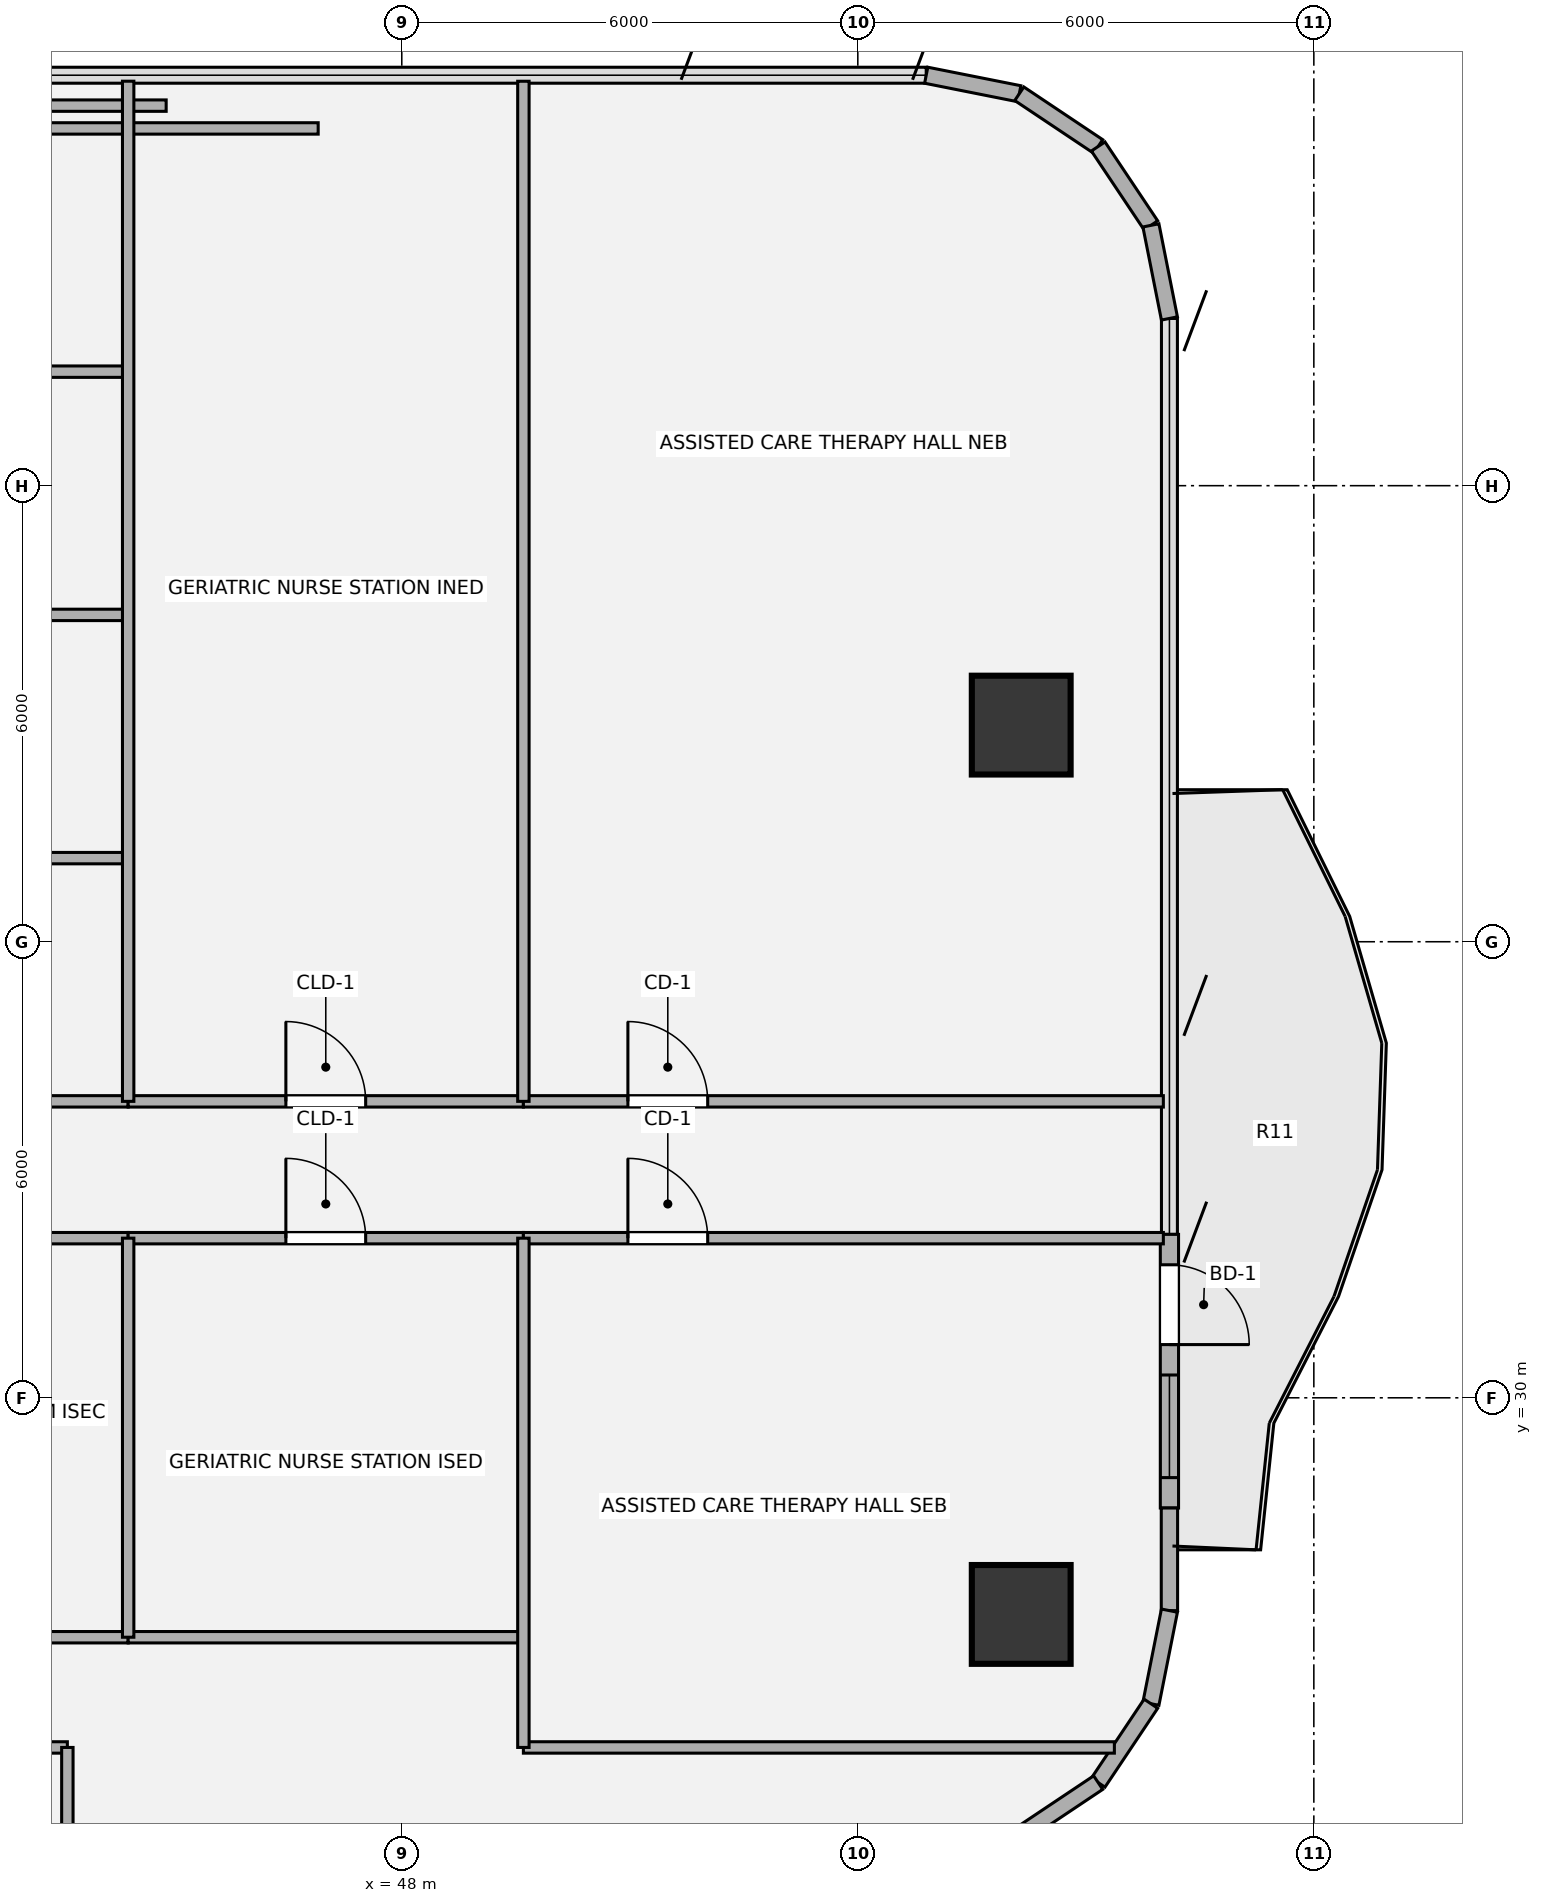
"""IFC4 building model, lengths in metres.
Left out: names, types, materials, properties, quantities, classifications, styles, units other than length and angle.
Written with IfcOpenShell. Run it as: python <this file> out.ifc"""

import sys

from ifc_helpers import new_model, si_unit, direction, frame, frame_2d, origin, origin_2d, place, context, subcontext, project, spatial, rectangle, hollow_circle, extrude, source, transform, mapped, element, fill, save


model = new_model("IFC4")
c1 = context("Model", 3, precision=1e-05, world=origin(), true_north=direction((0.0, 1.0)))
c2 = subcontext(c1, "Body", "Model", "MODEL_VIEW")
j1 = project(units=[si_unit("LENGTHUNIT", "METRE"), si_unit("PLANEANGLEUNIT", "RADIAN")], contexts=[c1])
p1 = place(None, origin())
s1 = spatial("IfcSite", under=j1, at=p1, CompositionType="ELEMENT")
p2 = place(p1, origin())
s2 = spatial("IfcBuilding", under=s1, at=p2, CompositionType="ELEMENT")
p3 = place(p2, frame((0.0, 0.0, 104.94)))
s3 = spatial("IfcBuildingStorey", under=s2, at=p3, CompositionType="ELEMENT", Elevation=104.94)
m1 = source(origin(), c2, "Body", "SweptSolid", [
    extrude(hollow_circle(Radius=0.65, WallThickness=0.045, at=origin_2d()), origin(), (0.0, 0.0, 1.0), 3.78),
])
for number, where, z_axis, x_axis in (
    (1, (56.15, 27.15, 0.0), (0.0, 0.0, 1.0), (1.0, 0.0, 0.0)),
    (2, (56.15, 38.85, 0.0), (0.0, 0.0, 1.0), (1.0, 0.0, 0.0)),
):
    element("IfcColumn", number, at=place(p3, frame(where, z_axis=z_axis, x_axis=x_axis)), inside=s3, PredefinedType="COLUMN", context=c2, shape_type="MappedRepresentation", body=[
        mapped(m1, transform((0.0, 0.0, 0.0), x_axis=(1.0, 0.0, 0.0), y_axis=(0.0, 1.0, 0.0), z_axis=(0.0, 0.0, 1.0), scale=1.0)),
    ])
for number, where, z_axis, x_axis in (
    (3, (54.9, 47.4, 0.0), (0.0, 0.0, 1.0), (0.981, -0.195, 0.0)),
    (4, (56.125, 47.156, 0.0), (0.0, 0.0, 1.0), (0.831, -0.556, 0.0)),
    (5, (57.163, 46.463, 0.0), (0.0, 0.0, 1.0), (0.556, -0.831, 0.0)),
    (6, (57.856, 45.425, 0.0), (0.0, 0.0, 1.0), (0.195, -0.981, 0.0)),
):
    element("IfcWall", number, at=place(p3, frame(where, z_axis=z_axis, x_axis=x_axis)), inside=s3, PredefinedType="SOLIDWALL", context=c2, shape_type="SweptSolid", body=[
        extrude(rectangle(XDim=1.249, YDim=0.215, at=frame_2d((0.624, 0.0))), origin(), (0.0, 0.0, 1.0), 3.53),
    ])
p4 = place(p3, frame((58.1, 32.15, 0.0), z_axis=(0.0, 0.0, 1.0), x_axis=(0.0, -1.0, 0.0)))
e7 = element("IfcWall", 7, at=p4, inside=s3, PredefinedType="SOLIDWALL", context=c2, shape_type="SweptSolid", body=[
    extrude(rectangle(XDim=3.6, YDim=0.24, at=frame_2d((1.8, 0.0))), origin(), (0.0, 0.0, 1.0), 3.53),
])
p5 = place(p4, frame((0.4, 0.0, 0.0)))
e8 = element("IfcOpeningElement", 8, at=p5, cuts=e7, PredefinedType="OPENING", context=c2, shape_type="SweptSolid", body=[
    extrude(rectangle(XDim=1.05, YDim=2.15, at=origin_2d()), frame((0.525, 0.13, 1.075), z_axis=(0.0, -1.0, 0.0), x_axis=(1.0, 0.0, 0.0)), (0.0, 0.0, 1.0), 0.26),
])
p6 = place(p4, frame((1.85, 0.0, 0.85)))
e9 = element("IfcOpeningElement", 9, at=p6, cuts=e7, PredefinedType="OPENING", context=c2, shape_type="SweptSolid", body=[
    extrude(rectangle(XDim=1.35, YDim=1.35, at=origin_2d()), frame((0.675, 0.13, 0.675), z_axis=(0.0, -1.0, 0.0), x_axis=(1.0, 0.0, 0.0)), (0.0, 0.0, 1.0), 0.26),
])
p7 = place(p3, frame((58.1, 28.55, 0.0), z_axis=(0.0, 0.0, 1.0), x_axis=(0.0, -1.0, 0.0)))
e10 = element("IfcWall", 10, at=p7, inside=s3, PredefinedType="SOLIDWALL", context=c2, shape_type="SweptSolid", body=[
    extrude(rectangle(XDim=1.35, YDim=0.215, at=frame_2d((0.675, 0.0))), origin(), (0.0, 0.0, 1.0), 3.53),
])
for number, where, z_axis, x_axis in (
    (11, (58.1, 27.2, 0.0), (0.0, 0.0, 1.0), (-0.195, -0.981, 0.0)),
    (12, (57.856, 25.975, 0.0), (0.0, 0.0, 1.0), (-0.556, -0.831, 0.0)),
    (13, (57.163, 24.937, 0.0), (0.0, 0.0, 1.0), (-0.831, -0.556, 0.0)),
):
    element("IfcWall", number, at=place(p3, frame(where, z_axis=z_axis, x_axis=x_axis)), inside=s3, PredefinedType="SOLIDWALL", context=c2, shape_type="SweptSolid", body=[
        extrude(rectangle(XDim=1.249, YDim=0.215, at=frame_2d((0.624, 0.0))), origin(), (0.0, 0.0, 1.0), 3.53),
    ])
p8 = place(p3, frame((36.9, 25.4, 0.0), z_axis=(0.0, 0.0, 1.0), x_axis=(1.0, 0.0, 0.0)))
e14 = element("IfcWall", 14, at=p8, inside=s3, PredefinedType="PARTITIONING", context=c2, shape_type="SweptSolid", body=[
    extrude(rectangle(XDim=6.7, YDim=0.15, at=frame_2d((3.35, 0.0))), origin(), (0.0, 0.0, 1.0), 3.5),
])
p9 = place(p3, frame((49.6, 25.4, 0.0), z_axis=(0.0, 0.0, 1.0), x_axis=(1.0, 0.0, 0.0)))
e15 = element("IfcWall", 15, at=p9, inside=s3, PredefinedType="PARTITIONING", context=c2, shape_type="SweptSolid", body=[
    extrude(rectangle(XDim=7.776, YDim=0.15, at=frame_2d((3.888, 0.0))), origin(), (0.0, 0.0, 1.0), 3.5),
])
p10 = place(p3, frame((36.9, 26.85, 0.0), z_axis=(0.0, 0.0, 1.0), x_axis=(1.0, 0.0, 0.0)))
e16 = element("IfcWall", 16, at=p10, inside=s3, PredefinedType="PARTITIONING", context=c2, shape_type="SweptSolid", body=[
    extrude(rectangle(XDim=7.5, YDim=0.15, at=frame_2d((3.75, 0.0))), origin(), (0.0, 0.0, 1.0), 2.903),
])
p11 = place(p3, frame((44.4, 26.85, 0.0), z_axis=(0.0, 0.0, 1.0), x_axis=(1.0, 0.0, 0.0)))
e17 = element("IfcWall", 17, at=p11, inside=s3, PredefinedType="PARTITIONING", context=c2, shape_type="SweptSolid", body=[
    extrude(rectangle(XDim=5.2, YDim=0.15, at=frame_2d((2.6, 0.0))), origin(), (0.0, 0.0, 1.0), 3.055),
])
p12 = place(p3, frame((36.9, 32.1, 0.0), z_axis=(0.0, 0.0, 1.0), x_axis=(1.0, 0.0, 0.0)))
e18 = element("IfcWall", 18, at=p12, inside=s3, PredefinedType="PARTITIONING", context=c2, shape_type="SweptSolid", body=[
    extrude(rectangle(XDim=7.5, YDim=0.15, at=frame_2d((3.75, 0.0))), origin(), (0.0, 0.0, 1.0), 2.982),
])
p13 = place(p3, frame((44.4, 32.1, 0.0), z_axis=(0.0, 0.0, 1.0), x_axis=(1.0, 0.0, 0.0)))
e19 = element("IfcWall", 19, at=p13, inside=s3, PredefinedType="PARTITIONING", context=c2, shape_type="SweptSolid", body=[
    extrude(rectangle(XDim=5.2, YDim=0.15, at=frame_2d((2.6, 0.0))), origin(), (0.0, 0.0, 1.0), 2.982),
])
p14 = place(p13, frame((2.075, 0.0, 0.0)))
e20 = element("IfcOpeningElement", 20, at=p14, cuts=e19, PredefinedType="OPENING", context=c2, shape_type="SweptSolid", body=[
    extrude(rectangle(XDim=1.05, YDim=2.1, at=origin_2d()), frame((0.525, 0.085, 1.05), z_axis=(0.0, -1.0, 0.0), x_axis=(1.0, 0.0, 0.0)), (0.0, 0.0, 1.0), 0.17),
])
p15 = place(p3, frame((49.6, 32.1, 0.0), z_axis=(0.0, 0.0, 1.0), x_axis=(1.0, 0.0, 0.0)))
e21 = element("IfcWall", 21, at=p15, inside=s3, PredefinedType="PARTITIONING", context=c2, shape_type="SweptSolid", body=[
    extrude(rectangle(XDim=8.42, YDim=0.15, at=frame_2d((4.21, 0.0))), origin(), (0.0, 0.0, 1.0), 2.982),
])
p16 = place(p15, frame((1.375, 0.0, 0.0)))
e22 = element("IfcOpeningElement", 22, at=p16, cuts=e21, PredefinedType="OPENING", context=c2, shape_type="SweptSolid", body=[
    extrude(rectangle(XDim=1.05, YDim=2.1, at=origin_2d()), frame((0.525, 0.085, 1.05), z_axis=(0.0, -1.0, 0.0), x_axis=(1.0, 0.0, 0.0)), (0.0, 0.0, 1.0), 0.17),
])
p17 = place(p3, frame((36.9, 33.9, 0.0), z_axis=(0.0, 0.0, 1.0), x_axis=(1.0, 0.0, 0.0)))
e23 = element("IfcWall", 23, at=p17, inside=s3, PredefinedType="PARTITIONING", context=c2, shape_type="SweptSolid", body=[
    extrude(rectangle(XDim=7.5, YDim=0.15, at=frame_2d((3.75, 0.0))), origin(), (0.0, 0.0, 1.0), 2.982),
])
p18 = place(p3, frame((44.4, 33.9, 0.0), z_axis=(0.0, 0.0, 1.0), x_axis=(1.0, 0.0, 0.0)))
e24 = element("IfcWall", 24, at=p18, inside=s3, PredefinedType="PARTITIONING", context=c2, shape_type="SweptSolid", body=[
    extrude(rectangle(XDim=5.2, YDim=0.15, at=frame_2d((2.6, 0.0))), origin(), (0.0, 0.0, 1.0), 2.982),
])
p19 = place(p18, frame((2.075, 0.0, 0.0)))
e25 = element("IfcOpeningElement", 25, at=p19, cuts=e24, PredefinedType="OPENING", context=c2, shape_type="SweptSolid", body=[
    extrude(rectangle(XDim=1.05, YDim=2.1, at=origin_2d()), frame((0.525, 0.085, 1.05), z_axis=(0.0, -1.0, 0.0), x_axis=(1.0, 0.0, 0.0)), (0.0, 0.0, 1.0), 0.17),
])
p20 = place(p3, frame((49.6, 33.9, 0.0), z_axis=(0.0, 0.0, 1.0), x_axis=(1.0, 0.0, 0.0)))
e26 = element("IfcWall", 26, at=p20, inside=s3, PredefinedType="PARTITIONING", context=c2, shape_type="SweptSolid", body=[
    extrude(rectangle(XDim=8.42, YDim=0.15, at=frame_2d((4.21, 0.0))), origin(), (0.0, 0.0, 1.0), 2.982),
])
p21 = place(p20, frame((1.375, 0.0, 0.0)))
e27 = element("IfcOpeningElement", 27, at=p21, cuts=e26, PredefinedType="OPENING", context=c2, shape_type="SweptSolid", body=[
    extrude(rectangle(XDim=1.05, YDim=2.1, at=origin_2d()), frame((0.525, 0.085, 1.05), z_axis=(0.0, -1.0, 0.0), x_axis=(1.0, 0.0, 0.0)), (0.0, 0.0, 1.0), 0.17),
])
p22 = place(p3, frame((36.9, 37.1, 0.0), z_axis=(0.0, 0.0, 1.0), x_axis=(1.0, 0.0, 0.0)))
e28 = element("IfcWall", 28, at=p22, inside=s3, PredefinedType="PARTITIONING", context=c2, shape_type="SweptSolid", body=[
    extrude(rectangle(XDim=7.5, YDim=0.15, at=frame_2d((3.75, 0.0))), origin(), (0.0, 0.0, 1.0), 2.982),
])
p23 = place(p3, frame((36.9, 40.3, 0.0), z_axis=(0.0, 0.0, 1.0), x_axis=(1.0, 0.0, 0.0)))
e29 = element("IfcWall", 29, at=p23, inside=s3, PredefinedType="PARTITIONING", context=c2, shape_type="SweptSolid", body=[
    extrude(rectangle(XDim=7.5, YDim=0.15, at=frame_2d((3.75, 0.0))), origin(), (0.0, 0.0, 1.0), 3.259),
])
p24 = place(p3, frame((36.9, 43.5, 0.0), z_axis=(0.0, 0.0, 1.0), x_axis=(1.0, 0.0, 0.0)))
e30 = element("IfcWall", 30, at=p24, inside=s3, PredefinedType="PARTITIONING", context=c2, shape_type="SweptSolid", body=[
    extrude(rectangle(XDim=7.5, YDim=0.15, at=frame_2d((3.75, 0.0))), origin(), (0.0, 0.0, 1.0), 3.308),
])
p25 = place(p3, frame((36.9, 46.7, 0.0), z_axis=(0.0, 0.0, 1.0), x_axis=(1.0, 0.0, 0.0)))
e31 = element("IfcWall", 31, at=p25, inside=s3, PredefinedType="PARTITIONING", context=c2, shape_type="SweptSolid", body=[
    extrude(rectangle(XDim=10.0, YDim=0.15, at=frame_2d((5.0, 0.0))), origin(), (0.0, 0.0, 1.0), 3.308),
])
p26 = place(p3, frame((27.1, 47.0, 0.0), z_axis=(0.0, 0.0, 1.0), x_axis=(1.0, 0.0, 0.0)))
e32 = element("IfcWall", 32, at=p26, inside=s3, PredefinedType="PARTITIONING", context=c2, shape_type="SweptSolid", body=[
    extrude(rectangle(XDim=17.8, YDim=0.15, at=frame_2d((8.9, 0.0))), origin(), (0.0, 0.0, 1.0), 3.308),
])
p27 = place(p26, frame((8.375, 0.0, 0.0)))
e33 = element("IfcOpeningElement", 33, at=p27, cuts=e32, PredefinedType="OPENING", context=c2, shape_type="SweptSolid", body=[
    extrude(rectangle(XDim=1.05, YDim=2.1, at=origin_2d()), frame((0.525, 0.085, 1.05), z_axis=(0.0, -1.0, 0.0), x_axis=(1.0, 0.0, 0.0)), (0.0, 0.0, 1.0), 0.17),
])
p28 = place(p3, frame((43.6, 21.958, 0.0), z_axis=(0.0, 0.0, 1.0), x_axis=(0.0, 1.0, 0.0)))
e34 = element("IfcWall", 34, at=p28, inside=s3, PredefinedType="PARTITIONING", context=c2, shape_type="SweptSolid", body=[
    extrude(rectangle(XDim=3.442, YDim=0.15, at=frame_2d((1.721, 0.0))), origin(), (0.0, 0.0, 1.0), 3.5),
])
p29 = place(p3, frame((44.4, 26.85, 0.0), z_axis=(0.0, 0.0, 1.0), x_axis=(0.0, 1.0, 0.0)))
e35 = element("IfcWall", 35, at=p29, inside=s3, PredefinedType="PARTITIONING", context=c2, shape_type="SweptSolid", body=[
    extrude(rectangle(XDim=5.25, YDim=0.15, at=frame_2d((2.625, 0.0))), origin(), (0.0, 0.0, 1.0), 3.5),
])
p30 = place(p3, frame((44.4, 33.9, 0.0), z_axis=(0.0, 0.0, 1.0), x_axis=(0.0, 1.0, 0.0)))
e36 = element("IfcWall", 36, at=p30, inside=s3, PredefinedType="PARTITIONING", context=c2, shape_type="SweptSolid", body=[
    extrude(rectangle(XDim=13.421, YDim=0.15, at=frame_2d((6.711, 0.0))), origin(), (0.0, 0.0, 1.0), 3.5),
])
p31 = place(p3, frame((49.6, 25.4, 0.0), z_axis=(0.0, 0.0, 1.0), x_axis=(0.0, 1.0, 0.0)))
e37 = element("IfcWall", 37, at=p31, inside=s3, PredefinedType="PARTITIONING", context=c2, shape_type="SweptSolid", body=[
    extrude(rectangle(XDim=6.7, YDim=0.15, at=frame_2d((3.35, 0.0))), origin(), (0.0, 0.0, 1.0), 3.5),
])
p32 = place(p3, frame((49.6, 33.9, 0.0), z_axis=(0.0, 0.0, 1.0), x_axis=(0.0, 1.0, 0.0)))
e38 = element("IfcWall", 38, at=p32, inside=s3, PredefinedType="PARTITIONING", context=c2, shape_type="SweptSolid", body=[
    extrude(rectangle(XDim=13.421, YDim=0.15, at=frame_2d((6.71, 0.0))), origin(), (0.0, 0.0, 1.0), 3.5),
])
m2 = source(origin(), c2, "Body", "SweptSolid", [
    extrude(rectangle(XDim=1.05, YDim=2.15, at=origin_2d()), frame((0.525, 0.025, 1.075), z_axis=(0.0, -1.0, 0.0), x_axis=(1.0, 0.0, 0.0)), (0.0, 0.0, 1.0), 0.05),
])
p33 = place(p5, origin())
e39 = element("IfcDoor", 39, at=p33, inside=s3, OperationType="SINGLE_SWING_RIGHT", PredefinedType="DOOR", context=c2, shape_type="MappedRepresentation", body=[
    mapped(m2, transform((0.0, 0.0, 0.0), x_axis=(1.0, 0.0, 0.0), y_axis=(0.0, 1.0, 0.0), z_axis=(0.0, 0.0, 1.0), scale=1.0)),
])
fill(e8, e39)
m3 = source(origin(), c2, "Body", "SweptSolid", [
    extrude(rectangle(XDim=1.35, YDim=1.35, at=origin_2d()), frame((0.675, 0.03, 0.675), z_axis=(0.0, -1.0, 0.0), x_axis=(1.0, 0.0, 0.0)), (0.0, 0.0, 1.0), 0.06),
])
p34 = place(p6, origin())
e40 = element("IfcWindow", 40, at=p34, inside=s3, PartitioningType="SINGLE_PANEL", PredefinedType="WINDOW", context=c2, shape_type="MappedRepresentation", body=[
    mapped(m3, transform((0.0, 0.0, 0.0), x_axis=(1.0, 0.0, 0.0), y_axis=(0.0, 1.0, 0.0), z_axis=(0.0, 0.0, 1.0), scale=1.0)),
])
fill(e9, e40)
m4 = source(origin(), c2, "Body", "SweptSolid", [
    extrude(rectangle(XDim=1.05, YDim=2.1, at=origin_2d()), frame((0.525, 0.025, 1.05), z_axis=(0.0, -1.0, 0.0), x_axis=(1.0, 0.0, 0.0)), (0.0, 0.0, 1.0), 0.05),
])
p35 = place(p14, origin())
e41 = element("IfcDoor", 41, at=p35, inside=s3, OperationType="SINGLE_SWING_LEFT", PredefinedType="DOOR", context=c2, shape_type="MappedRepresentation", body=[
    mapped(m4, transform((0.0, 0.0, 0.0), x_axis=(1.0, 0.0, 0.0), y_axis=(0.0, 1.0, 0.0), z_axis=(0.0, 0.0, 1.0), scale=1.0)),
])
fill(e20, e41)
m5 = source(origin(), c2, "Body", "SweptSolid", [
    extrude(rectangle(XDim=1.05, YDim=2.1, at=origin_2d()), frame((0.525, 0.025, 1.05), z_axis=(0.0, -1.0, 0.0), x_axis=(1.0, 0.0, 0.0)), (0.0, 0.0, 1.0), 0.05),
])
p36 = place(p16, origin())
e42 = element("IfcDoor", 42, at=p36, inside=s3, OperationType="SINGLE_SWING_LEFT", PredefinedType="DOOR", context=c2, shape_type="MappedRepresentation", body=[
    mapped(m5, transform((0.0, 0.0, 0.0), x_axis=(1.0, 0.0, 0.0), y_axis=(0.0, 1.0, 0.0), z_axis=(0.0, 0.0, 1.0), scale=1.0)),
])
fill(e22, e42)
p37 = place(p19, origin())
e43 = element("IfcDoor", 43, at=p37, inside=s3, OperationType="SINGLE_SWING_LEFT", PredefinedType="DOOR", context=c2, shape_type="MappedRepresentation", body=[
    mapped(m4, transform((0.0, 0.0, 0.0), x_axis=(1.0, 0.0, 0.0), y_axis=(0.0, 1.0, 0.0), z_axis=(0.0, 0.0, 1.0), scale=1.0)),
])
fill(e25, e43)
p38 = place(p21, origin())
e44 = element("IfcDoor", 44, at=p38, inside=s3, OperationType="SINGLE_SWING_LEFT", PredefinedType="DOOR", context=c2, shape_type="MappedRepresentation", body=[
    mapped(m5, transform((0.0, 0.0, 0.0), x_axis=(1.0, 0.0, 0.0), y_axis=(0.0, 1.0, 0.0), z_axis=(0.0, 0.0, 1.0), scale=1.0)),
])
fill(e27, e44)
save(model, sys.argv[1])
